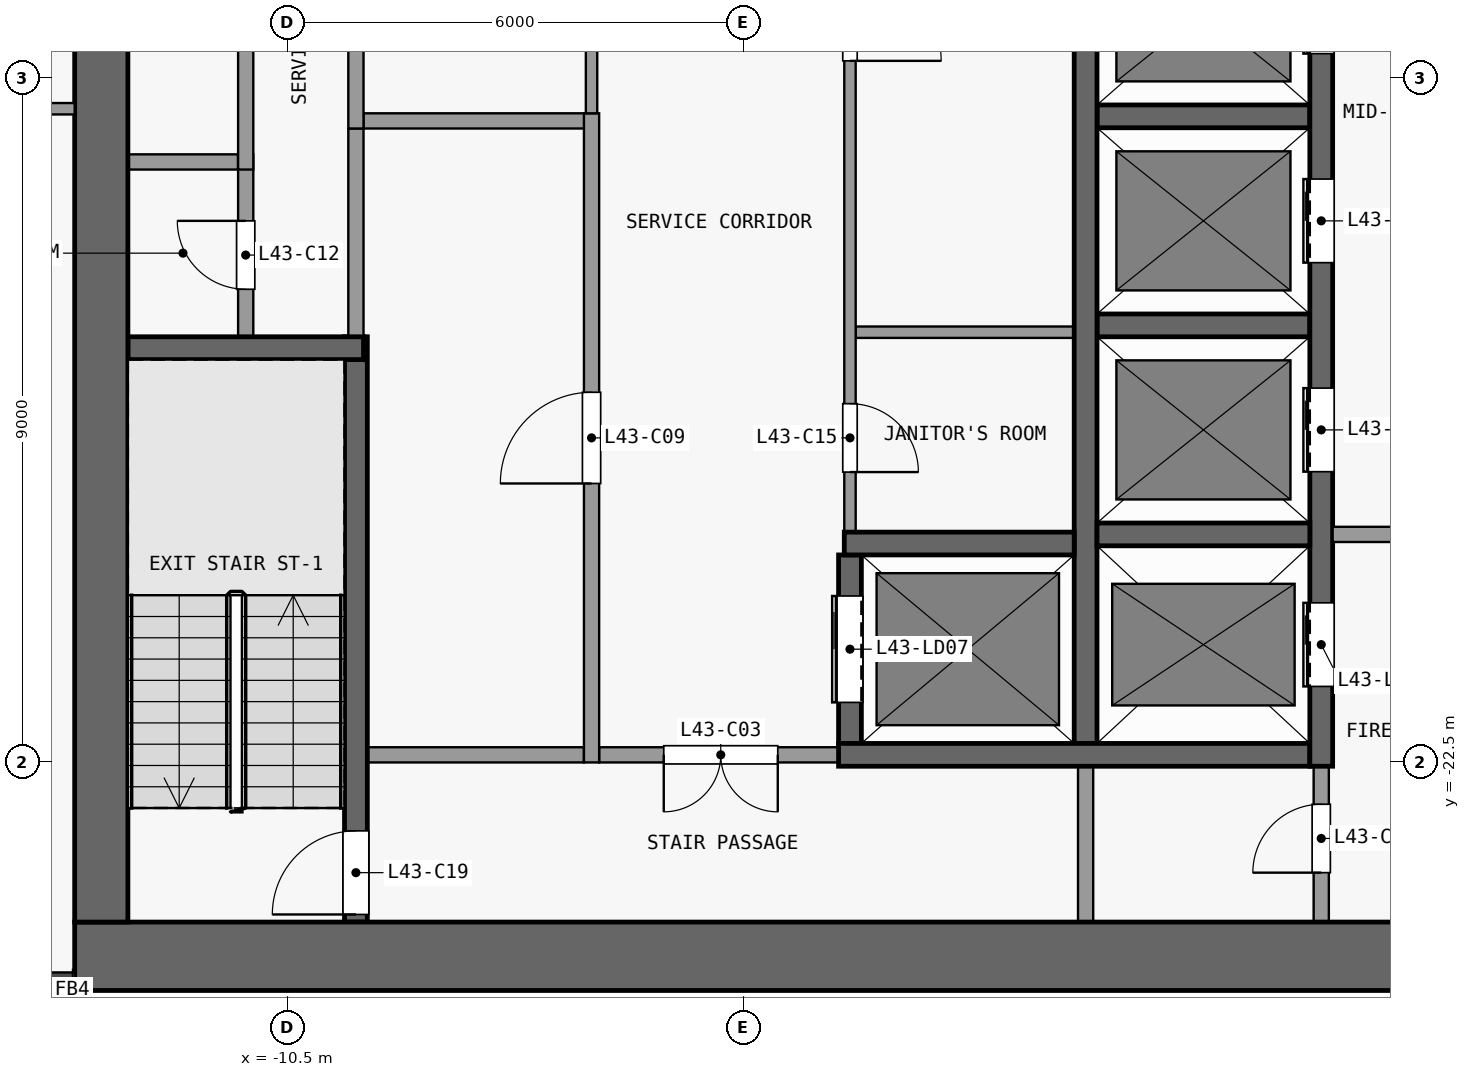
"""IFC4 building model, lengths in metres.
Left out: names, types, materials, properties, quantities, classifications, styles, units other than length and angle.
Written with IfcOpenShell. Run it as: python <this file> out.ifc"""

import sys

from ifc_helpers import new_model, si_unit, direction, frame, frame_2d, origin, place, context, subcontext, project, spatial, rectangle, extrude, element, fill, save


model = new_model("IFC4")
c1 = context("Model", 3, precision=1e-05, world=origin(), true_north=direction((0.0, 1.0)))
c2 = subcontext(c1, "Body", "Model", "MODEL_VIEW")
j1 = project(units=[si_unit("LENGTHUNIT", "METRE"), si_unit("PLANEANGLEUNIT", "RADIAN")], contexts=[c1])
p1 = place(None, origin())
s1 = spatial("IfcSite", under=j1, at=p1, CompositionType="ELEMENT")
p2 = place(p1, origin())
s2 = spatial("IfcBuilding", under=s1, at=p2, CompositionType="ELEMENT")
p3 = place(p2, frame((0.0, 0.0, 174.5)))
s3 = spatial("IfcBuildingStorey", under=s2, at=p3, CompositionType="ELEMENT", Elevation=174.5)
p4 = place(p3, frame((-13.3, -25.05, 0.0), z_axis=(0.0, 0.0, 1.0), x_axis=(1.0, 0.0, 0.0)))
e1 = element("IfcWall", 1, at=p4, inside=s3, PredefinedType="SHEAR", context=c2, shape_type="SweptSolid", body=[
    extrude(rectangle(XDim=26.6, YDim=0.9, at=frame_2d((13.3, 0.0))), origin(), (0.0, 0.0, 1.0), 3.3),
])
p5 = place(p3, frame((-12.95, -24.6, 0.0), z_axis=(0.0, 0.0, 1.0), x_axis=(0.0, 1.0, 0.0)))
e2 = element("IfcWall", 2, at=p5, inside=s3, PredefinedType="SHEAR", context=c2, shape_type="SweptSolid", body=[
    extrude(rectangle(XDim=16.1, YDim=0.7, at=frame_2d((8.05, 0.0))), origin(), (0.0, 0.0, 1.0), 3.3),
])
p6 = place(p3, frame((-9.45, -22.4, 0.0), z_axis=(0.0, 0.0, 1.0), x_axis=(1.0, 0.0, 0.0)))
e3 = element("IfcWall", 3, at=p6, inside=s3, PredefinedType="PARTITIONING", context=c2, shape_type="SweptSolid", body=[
    extrude(rectangle(XDim=2.85, YDim=0.2, at=frame_2d((1.425, 0.0))), origin(), (0.0, 0.0, 1.0), 3.3),
])
p7 = place(p3, frame((-3.25, -22.4, 0.0), z_axis=(0.0, 0.0, 1.0), x_axis=(-1.0, 0.0, 0.0)))
e4 = element("IfcWall", 4, at=p7, inside=s3, PredefinedType="PARTITIONING", context=c2, shape_type="SweptSolid", body=[
    extrude(rectangle(XDim=3.15, YDim=0.2, at=frame_2d((1.575, 0.0))), origin(), (0.0, 0.0, 1.0), 3.3),
])
p8 = place(p7, frame((0.8, 0.0, 0.0)))
e5 = element("IfcOpeningElement", 5, at=p8, cuts=e4, PredefinedType="OPENING", context=c2, shape_type="SweptSolid", body=[
    extrude(rectangle(XDim=1.5, YDim=2.1, at=frame_2d((0.75, 1.05))), frame((0.0, 0.11, 0.0), z_axis=(0.0, -1.0, 0.0), x_axis=(1.0, 0.0, 0.0)), (0.0, 0.0, 1.0), 0.22),
])
p9 = place(p3, frame((-3.25, -22.4, 0.0), z_axis=(0.0, 0.0, 1.0), x_axis=(1.0, 0.0, 0.0)))
e6 = element("IfcWall", 6, at=p9, inside=s3, PredefinedType="SHEAR", context=c2, shape_type="SweptSolid", body=[
    extrude(rectangle(XDim=6.2, YDim=0.3, at=frame_2d((3.1, 0.0))), origin(), (0.0, 0.0, 1.0), 3.3),
])
p10 = place(p3, frame((-3.175, -19.62, 0.0), z_axis=(0.0, 0.0, 1.0), x_axis=(1.0, 0.0, 0.0)))
e7 = element("IfcWall", 7, at=p10, inside=s3, PredefinedType="SHEAR", context=c2, shape_type="SweptSolid", body=[
    extrude(rectangle(XDim=3.025, YDim=0.3, at=frame_2d((1.513, 0.0))), origin(), (0.0, 0.0, 1.0), 3.3),
])
p11 = place(p3, frame((0.15, -19.5, 0.0), z_axis=(0.0, 0.0, 1.0), x_axis=(1.0, 0.0, 0.0)))
e8 = element("IfcWall", 8, at=p11, inside=s3, PredefinedType="SHEAR", context=c2, shape_type="SweptSolid", body=[
    extrude(rectangle(XDim=2.8, YDim=0.3, at=frame_2d((1.4, 0.0))), origin(), (0.0, 0.0, 1.0), 3.3),
])
p12 = place(p3, frame((6.575, -19.5, 0.0), z_axis=(0.0, 0.0, 1.0), x_axis=(-1.0, 0.0, 0.0)))
e9 = element("IfcWall", 9, at=p12, inside=s3, PredefinedType="PARTITIONING", context=c2, shape_type="SweptSolid", body=[
    extrude(rectangle(XDim=3.325, YDim=0.2, at=frame_2d((1.663, 0.0))), origin(), (0.0, 0.0, 1.0), 3.3),
])
p13 = place(p12, frame((1.025, 0.0, 0.0)))
e10 = element("IfcOpeningElement", 10, at=p13, cuts=e9, PredefinedType="OPENING", context=c2, shape_type="SweptSolid", body=[
    extrude(rectangle(XDim=1.5, YDim=2.1, at=frame_2d((0.75, 1.05))), frame((0.0, 0.11, 0.0), z_axis=(0.0, -1.0, 0.0), x_axis=(1.0, 0.0, 0.0)), (0.0, 0.0, 1.0), 0.22),
])
p14 = place(p3, frame((-12.6, -17.05, 0.0), z_axis=(0.0, 0.0, 1.0), x_axis=(1.0, 0.0, 0.0)))
e11 = element("IfcWall", 11, at=p14, inside=s3, PredefinedType="SHEAR", context=c2, shape_type="SweptSolid", body=[
    extrude(rectangle(XDim=3.1, YDim=0.3, at=frame_2d((1.55, 0.0))), origin(), (0.0, 0.0, 1.0), 3.3),
])
p15 = place(p3, frame((-3.025, -16.84, 0.0), z_axis=(0.0, 0.0, 1.0), x_axis=(1.0, 0.0, 0.0)))
e12 = element("IfcWall", 12, at=p15, inside=s3, PredefinedType="PARTITIONING", context=c2, shape_type="SweptSolid", body=[
    extrude(rectangle(XDim=2.875, YDim=0.15, at=frame_2d((1.438, 0.0))), origin(), (0.0, 0.0, 1.0), 3.3),
])
p16 = place(p3, frame((0.15, -16.75, 0.0), z_axis=(0.0, 0.0, 1.0), x_axis=(1.0, 0.0, 0.0)))
e13 = element("IfcWall", 13, at=p16, inside=s3, PredefinedType="SHEAR", context=c2, shape_type="SweptSolid", body=[
    extrude(rectangle(XDim=2.8, YDim=0.3, at=frame_2d((1.4, 0.0))), origin(), (0.0, 0.0, 1.0), 3.3),
])
p17 = place(p3, frame((-12.6, -14.6, 0.0), z_axis=(0.0, 0.0, 1.0), x_axis=(1.0, 0.0, 0.0)))
e14 = element("IfcWall", 14, at=p17, inside=s3, PredefinedType="PARTITIONING", context=c2, shape_type="SweptSolid", body=[
    extrude(rectangle(XDim=1.45, YDim=0.2, at=frame_2d((0.725, 0.0))), origin(), (0.0, 0.0, 1.0), 3.3),
])
p18 = place(p3, frame((-9.5, -14.06, 0.0), z_axis=(0.0, 0.0, 1.0), x_axis=(1.0, 0.0, 0.0)))
e15 = element("IfcWall", 15, at=p18, inside=s3, PredefinedType="PARTITIONING", context=c2, shape_type="SweptSolid", body=[
    extrude(rectangle(XDim=3.075, YDim=0.2, at=frame_2d((1.538, 0.0))), origin(), (0.0, 0.0, 1.0), 3.3),
])
p19 = place(p3, frame((0.15, -14.0, 0.0), z_axis=(0.0, 0.0, 1.0), x_axis=(1.0, 0.0, 0.0)))
e16 = element("IfcWall", 16, at=p19, inside=s3, PredefinedType="SHEAR", context=c2, shape_type="SweptSolid", body=[
    extrude(rectangle(XDim=2.8, YDim=0.3, at=frame_2d((1.4, 0.0))), origin(), (0.0, 0.0, 1.0), 3.3),
])
p20 = place(p3, frame((-11.05, -16.9, 0.0), z_axis=(0.0, 0.0, 1.0), x_axis=(0.0, 1.0, 0.0)))
e17 = element("IfcWall", 17, at=p20, inside=s3, PredefinedType="PARTITIONING", context=c2, shape_type="SweptSolid", body=[
    extrude(rectangle(XDim=2.4, YDim=0.2, at=frame_2d((1.2, 0.0))), origin(), (0.0, 0.0, 1.0), 3.3),
])
p21 = place(p20, frame((0.625, 0.0, 0.0)))
e18 = element("IfcOpeningElement", 18, at=p21, cuts=e17, PredefinedType="OPENING", context=c2, shape_type="SweptSolid", body=[
    extrude(rectangle(XDim=0.9, YDim=2.1, at=frame_2d((0.45, 1.05))), frame((0.0, 0.11, 0.0), z_axis=(0.0, -1.0, 0.0), x_axis=(1.0, 0.0, 0.0)), (0.0, 0.0, 1.0), 0.22),
])
p22 = place(p3, frame((-11.05, -14.7, 0.0), z_axis=(0.0, 0.0, 1.0), x_axis=(0.0, 1.0, 0.0)))
e19 = element("IfcWall", 19, at=p22, inside=s3, PredefinedType="PARTITIONING", context=c2, shape_type="SweptSolid", body=[
    extrude(rectangle(XDim=6.2, YDim=0.2, at=frame_2d((3.1, 0.0))), origin(), (0.0, 0.0, 1.0), 3.3),
])
p23 = place(p22, frame((2.7, 0.0, 0.0)))
e20 = element("IfcOpeningElement", 20, at=p23, cuts=e19, PredefinedType="OPENING", context=c2, shape_type="SweptSolid", body=[
    extrude(rectangle(XDim=0.9, YDim=2.1, at=frame_2d((0.45, 1.05))), frame((0.0, 0.11, 0.0), z_axis=(0.0, -1.0, 0.0), x_axis=(1.0, 0.0, 0.0)), (0.0, 0.0, 1.0), 0.22),
])
p24 = place(p3, frame((-9.6, -24.6, 0.0), z_axis=(0.0, 0.0, 1.0), x_axis=(0.0, 1.0, 0.0)))
e21 = element("IfcWall", 21, at=p24, inside=s3, PredefinedType="SHEAR", context=c2, shape_type="SweptSolid", body=[
    extrude(rectangle(XDim=7.7, YDim=0.3, at=frame_2d((3.85, 0.0))), origin(), (0.0, 0.0, 1.0), 3.3),
])
p25 = place(p24, frame((0.1, 0.0, 0.0)))
e22 = element("IfcOpeningElement", 22, at=p25, cuts=e21, PredefinedType="OPENING", context=c2, shape_type="SweptSolid", body=[
    extrude(rectangle(XDim=1.1, YDim=2.1, at=frame_2d((0.55, 1.05))), frame((0.0, 0.16, 0.0), z_axis=(0.0, -1.0, 0.0), x_axis=(1.0, 0.0, 0.0)), (0.0, 0.0, 1.0), 0.32),
])
p26 = place(p3, frame((-9.6, -16.9, 0.0), z_axis=(0.0, 0.0, 1.0), x_axis=(0.0, 1.0, 0.0)))
e23 = element("IfcWall", 23, at=p26, inside=s3, PredefinedType="PARTITIONING", context=c2, shape_type="SweptSolid", body=[
    extrude(rectangle(XDim=2.74, YDim=0.2, at=frame_2d((1.37, 0.0))), origin(), (0.0, 0.0, 1.0), 3.3),
])
p27 = place(p3, frame((-9.6, -14.16, 0.0), z_axis=(0.0, 0.0, 1.0), x_axis=(0.0, 1.0, 0.0)))
e24 = element("IfcWall", 24, at=p27, inside=s3, PredefinedType="PARTITIONING", context=c2, shape_type="SweptSolid", body=[
    extrude(rectangle(XDim=5.66, YDim=0.2, at=frame_2d((2.83, 0.0))), origin(), (0.0, 0.0, 1.0), 3.3),
])
p28 = place(p3, frame((-6.5, -22.5, 0.0), z_axis=(0.0, 0.0, 1.0), x_axis=(0.0, 1.0, 0.0)))
e25 = element("IfcWall", 25, at=p28, inside=s3, PredefinedType="PARTITIONING", context=c2, shape_type="SweptSolid", body=[
    extrude(rectangle(XDim=8.54, YDim=0.2, at=frame_2d((4.27, 0.0))), origin(), (0.0, 0.0, 1.0), 3.3),
])
p29 = place(p28, frame((3.67, 0.0, 0.0)))
e26 = element("IfcOpeningElement", 26, at=p29, cuts=e25, PredefinedType="OPENING", context=c2, shape_type="SweptSolid", body=[
    extrude(rectangle(XDim=1.2, YDim=2.1, at=frame_2d((0.6, 1.05))), frame((0.0, 0.11, 0.0), z_axis=(0.0, -1.0, 0.0), x_axis=(1.0, 0.0, 0.0)), (0.0, 0.0, 1.0), 0.22),
])
p30 = place(p3, frame((-6.5, -13.96, 0.0), z_axis=(0.0, 0.0, 1.0), x_axis=(0.0, 1.0, 0.0)))
e27 = element("IfcWall", 27, at=p30, inside=s3, PredefinedType="PARTITIONING", context=c2, shape_type="SweptSolid", body=[
    extrude(rectangle(XDim=5.46, YDim=0.15, at=frame_2d((2.73, 0.0))), origin(), (0.0, 0.0, 1.0), 3.3),
])
p31 = place(p30, frame((2.08, 0.0, 0.0)))
e28 = element("IfcOpeningElement", 28, at=p31, cuts=e27, PredefinedType="OPENING", context=c2, shape_type="SweptSolid", body=[
    extrude(rectangle(XDim=1.2, YDim=2.1, at=frame_2d((0.6, 1.05))), frame((0.0, 0.085, 0.0), z_axis=(0.0, -1.0, 0.0), x_axis=(1.0, 0.0, 0.0)), (0.0, 0.0, 1.0), 0.17),
])
p32 = place(p3, frame((-3.1, -22.25, 0.0), z_axis=(0.0, 0.0, 1.0), x_axis=(0.0, 1.0, 0.0)))
e29 = element("IfcWall", 29, at=p32, inside=s3, PredefinedType="SHEAR", context=c2, shape_type="SweptSolid", body=[
    extrude(rectangle(XDim=2.48, YDim=0.3, at=frame_2d((1.24, 0.0))), origin(), (0.0, 0.0, 1.0), 3.3),
])
p33 = place(p32, frame((0.54, 0.0, 0.0)))
e30 = element("IfcOpeningElement", 30, at=p33, cuts=e29, PredefinedType="OPENING", context=c2, shape_type="SweptSolid", body=[
    extrude(rectangle(XDim=1.4, YDim=2.1, at=frame_2d((0.7, 1.05))), frame((0.0, 0.16, 0.0), z_axis=(0.0, -1.0, 0.0), x_axis=(1.0, 0.0, 0.0)), (0.0, 0.0, 1.0), 0.32),
])
p34 = place(p3, frame((-3.1, -8.5, 0.0), z_axis=(0.0, 0.0, 1.0), x_axis=(0.0, -1.0, 0.0)))
e31 = element("IfcWall", 31, at=p34, inside=s3, PredefinedType="PARTITIONING", context=c2, shape_type="SweptSolid", body=[
    extrude(rectangle(XDim=10.97, YDim=0.15, at=frame_2d((5.485, 0.0))), origin(), (0.0, 0.0, 1.0), 3.3),
])
p35 = place(p34, frame((9.28, 0.0, 0.0)))
e32 = element("IfcOpeningElement", 32, at=p35, cuts=e31, PredefinedType="OPENING", context=c2, shape_type="SweptSolid", body=[
    extrude(rectangle(XDim=0.9, YDim=2.1, at=frame_2d((0.45, 1.05))), frame((0.0, 0.085, 0.0), z_axis=(0.0, -1.0, 0.0), x_axis=(1.0, 0.0, 0.0)), (0.0, 0.0, 1.0), 0.17),
])
p36 = place(p34, frame((3.57, 0.0, 0.0)))
e33 = element("IfcOpeningElement", 33, at=p36, cuts=e31, PredefinedType="OPENING", context=c2, shape_type="SweptSolid", body=[
    extrude(rectangle(XDim=1.2, YDim=2.1, at=frame_2d((0.6, 1.05))), frame((0.0, 0.085, 0.0), z_axis=(0.0, -1.0, 0.0), x_axis=(1.0, 0.0, 0.0)), (0.0, 0.0, 1.0), 0.17),
])
p37 = place(p3, frame((0.0, -24.6, 0.0), z_axis=(0.0, 0.0, 1.0), x_axis=(0.0, 1.0, 0.0)))
e34 = element("IfcWall", 34, at=p37, inside=s3, PredefinedType="PARTITIONING", context=c2, shape_type="SweptSolid", body=[
    extrude(rectangle(XDim=2.05, YDim=0.2, at=frame_2d((1.025, 0.0))), origin(), (0.0, 0.0, 1.0), 3.3),
])
p38 = place(p3, frame((0.0, -22.25, 0.0), z_axis=(0.0, 0.0, 1.0), x_axis=(0.0, 1.0, 0.0)))
e35 = element("IfcWall", 35, at=p38, inside=s3, PredefinedType="SHEAR", context=c2, shape_type="SweptSolid", body=[
    extrude(rectangle(XDim=13.75, YDim=0.3, at=frame_2d((6.875, 0.0))), origin(), (0.0, 0.0, 1.0), 3.3),
])
p39 = place(p3, frame((3.1, -24.6, 0.0), z_axis=(0.0, 0.0, 1.0), x_axis=(0.0, 1.0, 0.0)))
e36 = element("IfcWall", 36, at=p39, inside=s3, PredefinedType="PARTITIONING", context=c2, shape_type="SweptSolid", body=[
    extrude(rectangle(XDim=2.05, YDim=0.2, at=frame_2d((1.025, 0.0))), origin(), (0.0, 0.0, 1.0), 3.3),
])
p40 = place(p39, frame((0.65, 0.0, 0.0)))
e37 = element("IfcOpeningElement", 37, at=p40, cuts=e36, PredefinedType="OPENING", context=c2, shape_type="SweptSolid", body=[
    extrude(rectangle(XDim=0.9, YDim=2.1, at=frame_2d((0.45, 1.05))), frame((0.0, 0.11, 0.0), z_axis=(0.0, -1.0, 0.0), x_axis=(1.0, 0.0, 0.0)), (0.0, 0.0, 1.0), 0.22),
])
p41 = place(p3, frame((3.1, -22.55, 0.0), z_axis=(0.0, 0.0, 1.0), x_axis=(0.0, 1.0, 0.0)))
e38 = element("IfcWall", 38, at=p41, inside=s3, PredefinedType="SHEAR", context=c2, shape_type="SweptSolid", body=[
    extrude(rectangle(XDim=14.05, YDim=0.3, at=frame_2d((7.025, 0.0))), origin(), (0.0, 0.0, 1.0), 3.3),
])
p42 = place(p41, frame((1.05, 0.0, 0.0)))
e39 = element("IfcOpeningElement", 39, at=p42, cuts=e38, PredefinedType="OPENING", context=c2, shape_type="SweptSolid", body=[
    extrude(rectangle(XDim=1.1, YDim=2.1, at=frame_2d((0.55, 1.05))), frame((0.0, 0.16, 0.0), z_axis=(0.0, -1.0, 0.0), x_axis=(1.0, 0.0, 0.0)), (0.0, 0.0, 1.0), 0.32),
])
p43 = place(p41, frame((3.875, 0.0, 0.0)))
e40 = element("IfcOpeningElement", 40, at=p43, cuts=e38, PredefinedType="OPENING", context=c2, shape_type="SweptSolid", body=[
    extrude(rectangle(XDim=1.1, YDim=2.1, at=frame_2d((0.55, 1.05))), frame((0.0, 0.16, 0.0), z_axis=(0.0, -1.0, 0.0), x_axis=(1.0, 0.0, 0.0)), (0.0, 0.0, 1.0), 0.32),
])
p44 = place(p41, frame((6.625, 0.0, 0.0)))
e41 = element("IfcOpeningElement", 41, at=p44, cuts=e38, PredefinedType="OPENING", context=c2, shape_type="SweptSolid", body=[
    extrude(rectangle(XDim=1.1, YDim=2.1, at=frame_2d((0.55, 1.05))), frame((0.0, 0.16, 0.0), z_axis=(0.0, -1.0, 0.0), x_axis=(1.0, 0.0, 0.0)), (0.0, 0.0, 1.0), 0.32),
])
p45 = place(p41, frame((9.375, 0.0, 0.0)))
e42 = element("IfcOpeningElement", 42, at=p45, cuts=e38, PredefinedType="OPENING", context=c2, shape_type="SweptSolid", body=[
    extrude(rectangle(XDim=1.1, YDim=2.1, at=frame_2d((0.55, 1.05))), frame((0.0, 0.16, 0.0), z_axis=(0.0, -1.0, 0.0), x_axis=(1.0, 0.0, 0.0)), (0.0, 0.0, 1.0), 0.32),
])
p46 = place(p41, frame((12.125, 0.0, 0.0)))
e43 = element("IfcOpeningElement", 43, at=p46, cuts=e38, PredefinedType="OPENING", context=c2, shape_type="SweptSolid", body=[
    extrude(rectangle(XDim=1.1, YDim=2.1, at=frame_2d((0.55, 1.05))), frame((0.0, 0.16, 0.0), z_axis=(0.0, -1.0, 0.0), x_axis=(1.0, 0.0, 0.0)), (0.0, 0.0, 1.0), 0.32),
])
p47 = place(p3, frame((-19.262, -13.9, 0.0), z_axis=(0.0, 0.0, 1.0), x_axis=(1.0, 0.0, 0.0)))
e44 = element("IfcWall", 44, at=p47, inside=s3, PredefinedType="PARTITIONING", context=c2, shape_type="SweptSolid", body=[
    extrude(rectangle(XDim=5.962, YDim=0.15, at=frame_2d((2.981, 0.0))), origin(), (0.0, 0.0, 1.0), 3.3),
])
p48 = place(p47, frame((4.062, 0.0, 0.0)))
e45 = element("IfcOpeningElement", 45, at=p48, cuts=e44, PredefinedType="OPENING", context=c2, shape_type="SweptSolid", body=[
    extrude(rectangle(XDim=0.9, YDim=2.1, at=frame_2d((0.45, 1.05))), frame((0.0, 0.085, 0.0), z_axis=(0.0, -1.0, 0.0), x_axis=(1.0, 0.0, 0.0)), (0.0, 0.0, 1.0), 0.17),
])
p49 = place(p42, origin())
e46 = element("IfcDoor", 46, at=p49, inside=s3, OperationType="DOUBLE_DOOR_SLIDING", PredefinedType="DOOR", context=c2, shape_type="SweptSolid", body=[
    extrude(rectangle(XDim=1.1, YDim=2.1, at=frame_2d((0.55, 1.05))), frame((0.0, 0.025, 0.0), z_axis=(0.0, -1.0, 0.0), x_axis=(1.0, 0.0, 0.0)), (0.0, 0.0, 1.0), 0.05),
])
fill(e39, e46)
p50 = place(p43, origin())
e47 = element("IfcDoor", 47, at=p50, inside=s3, OperationType="DOUBLE_DOOR_SLIDING", PredefinedType="DOOR", context=c2, shape_type="SweptSolid", body=[
    extrude(rectangle(XDim=1.1, YDim=2.1, at=frame_2d((0.55, 1.05))), frame((0.0, 0.025, 0.0), z_axis=(0.0, -1.0, 0.0), x_axis=(1.0, 0.0, 0.0)), (0.0, 0.0, 1.0), 0.05),
])
fill(e40, e47)
p51 = place(p44, origin())
e48 = element("IfcDoor", 48, at=p51, inside=s3, OperationType="DOUBLE_DOOR_SLIDING", PredefinedType="DOOR", context=c2, shape_type="SweptSolid", body=[
    extrude(rectangle(XDim=1.1, YDim=2.1, at=frame_2d((0.55, 1.05))), frame((0.0, 0.025, 0.0), z_axis=(0.0, -1.0, 0.0), x_axis=(1.0, 0.0, 0.0)), (0.0, 0.0, 1.0), 0.05),
])
fill(e41, e48)
p52 = place(p45, origin())
e49 = element("IfcDoor", 49, at=p52, inside=s3, OperationType="DOUBLE_DOOR_SLIDING", PredefinedType="DOOR", context=c2, shape_type="SweptSolid", body=[
    extrude(rectangle(XDim=1.1, YDim=2.1, at=frame_2d((0.55, 1.05))), frame((0.0, 0.025, 0.0), z_axis=(0.0, -1.0, 0.0), x_axis=(1.0, 0.0, 0.0)), (0.0, 0.0, 1.0), 0.05),
])
fill(e42, e49)
p53 = place(p33, origin())
e50 = element("IfcDoor", 50, at=p53, inside=s3, OperationType="DOUBLE_DOOR_SLIDING", PredefinedType="DOOR", context=c2, shape_type="SweptSolid", body=[
    extrude(rectangle(XDim=1.4, YDim=2.1, at=frame_2d((0.7, 1.05))), frame((0.0, 0.025, 0.0), z_axis=(0.0, -1.0, 0.0), x_axis=(1.0, 0.0, 0.0)), (0.0, 0.0, 1.0), 0.05),
])
fill(e30, e50)
p54 = place(p8, origin())
e51 = element("IfcDoor", 51, at=p54, inside=s3, OperationType="DOUBLE_DOOR_SINGLE_SWING", PredefinedType="DOOR", context=c2, shape_type="SweptSolid", body=[
    extrude(rectangle(XDim=1.5, YDim=2.1, at=frame_2d((0.75, 1.05))), frame((0.0, 0.025, 0.0), z_axis=(0.0, -1.0, 0.0), x_axis=(1.0, 0.0, 0.0)), (0.0, 0.0, 1.0), 0.05),
])
fill(e5, e51)
p55 = place(p40, origin())
e52 = element("IfcDoor", 52, at=p55, inside=s3, OperationType="SINGLE_SWING_LEFT", PredefinedType="DOOR", context=c2, shape_type="SweptSolid", body=[
    extrude(rectangle(XDim=0.9, YDim=2.1, at=frame_2d((0.45, 1.05))), frame((0.0, 0.025, 0.0), z_axis=(0.0, -1.0, 0.0), x_axis=(1.0, 0.0, 0.0)), (0.0, 0.0, 1.0), 0.05),
])
fill(e37, e52)
p56 = place(p29, origin())
e53 = element("IfcDoor", 53, at=p56, inside=s3, OperationType="SINGLE_SWING_LEFT", PredefinedType="DOOR", context=c2, shape_type="SweptSolid", body=[
    extrude(rectangle(XDim=1.2, YDim=2.1, at=frame_2d((0.6, 1.05))), frame((0.0, 0.025, 0.0), z_axis=(0.0, -1.0, 0.0), x_axis=(1.0, 0.0, 0.0)), (0.0, 0.0, 1.0), 0.05),
])
fill(e26, e53)
p57 = place(p21, origin())
e54 = element("IfcDoor", 54, at=p57, inside=s3, OperationType="SINGLE_SWING_RIGHT", PredefinedType="DOOR", context=c2, shape_type="SweptSolid", body=[
    extrude(rectangle(XDim=0.9, YDim=2.1, at=frame_2d((0.45, 1.05))), frame((0.0, 0.025, 0.0), z_axis=(0.0, -1.0, 0.0), x_axis=(1.0, 0.0, 0.0)), (0.0, 0.0, 1.0), 0.05),
])
fill(e18, e54)
p58 = place(p35, origin())
e55 = element("IfcDoor", 55, at=p58, inside=s3, OperationType="SINGLE_SWING_RIGHT", PredefinedType="DOOR", context=c2, shape_type="SweptSolid", body=[
    extrude(rectangle(XDim=0.9, YDim=2.1, at=frame_2d((0.45, 1.05))), frame((0.0, 0.025, 0.0), z_axis=(0.0, -1.0, 0.0), x_axis=(1.0, 0.0, 0.0)), (0.0, 0.0, 1.0), 0.05),
])
fill(e32, e55)
p59 = place(p36, origin())
e56 = element("IfcDoor", 56, at=p59, inside=s3, OperationType="SINGLE_SWING_RIGHT", PredefinedType="DOOR", context=c2, shape_type="SweptSolid", body=[
    extrude(rectangle(XDim=1.2, YDim=2.1, at=frame_2d((0.6, 1.05))), frame((0.0, 0.025, 0.0), z_axis=(0.0, -1.0, 0.0), x_axis=(1.0, 0.0, 0.0)), (0.0, 0.0, 1.0), 0.05),
])
fill(e33, e56)
p60 = place(p25, origin())
e57 = element("IfcDoor", 57, at=p60, inside=s3, OperationType="SINGLE_SWING_LEFT", PredefinedType="DOOR", context=c2, shape_type="SweptSolid", body=[
    extrude(rectangle(XDim=1.1, YDim=2.1, at=frame_2d((0.55, 1.05))), frame((0.0, 0.025, 0.0), z_axis=(0.0, -1.0, 0.0), x_axis=(1.0, 0.0, 0.0)), (0.0, 0.0, 1.0), 0.05),
])
fill(e22, e57)
save(model, sys.argv[1])
